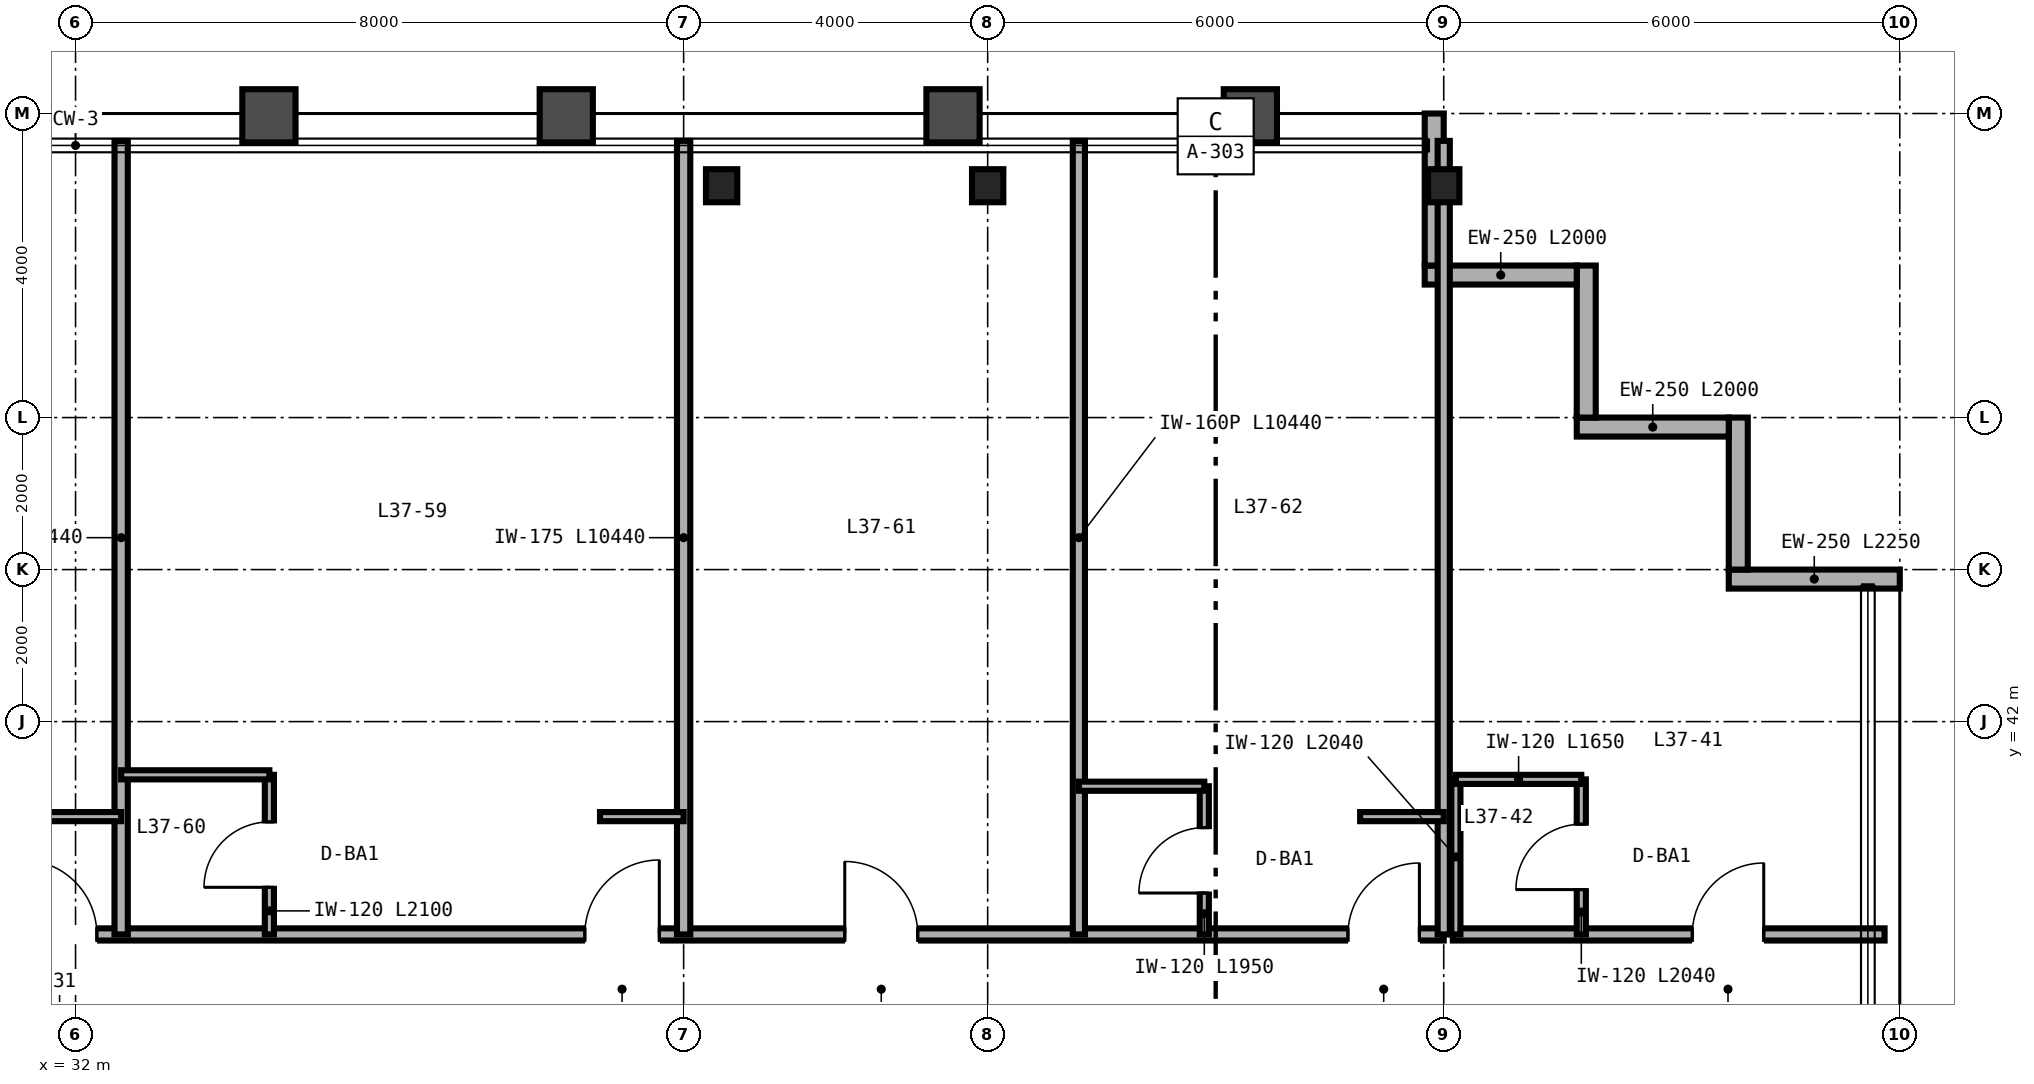
"""IFC4 building model, lengths in metres.
Left out: names, types, materials, properties, quantities, classifications, styles, units other than length and angle.
Written with IfcOpenShell. Run it as: python <this file> out.ifc"""

import sys

from ifc_helpers import new_model, si_unit, direction, frame, frame_2d, origin, origin_2d, place, context, subcontext, project, spatial, rectangle, i_section, extrude, source, transform, mapped, element, fill, save


model = new_model("IFC4")
c1 = context("Model", 3, precision=1e-05, world=origin(), true_north=direction((0.0, 1.0)))
c2 = subcontext(c1, "Body", "Model", "MODEL_VIEW")
j1 = project(units=[si_unit("LENGTHUNIT", "METRE"), si_unit("PLANEANGLEUNIT", "RADIAN")], contexts=[c1])
p1 = place(None, origin())
s1 = spatial("IfcSite", under=j1, at=p1, CompositionType="ELEMENT")
p2 = place(p1, origin())
s2 = spatial("IfcBuilding", under=s1, at=p2, CompositionType="ELEMENT")
p3 = place(p2, frame((0.0, 0.0, 147.6)))
s3 = spatial("IfcBuildingStorey", under=s2, at=p3, CompositionType="ELEMENT", Elevation=147.6)
m1 = source(origin(), c2, "Body", "SweptSolid", [
    extrude(i_section(OverallWidth=0.412, OverallDepth=0.435, WebThickness=0.036, FlangeThickness=0.057, FilletRadius=0.025, at=origin_2d()), origin(), (0.0, 0.0, 1.0), 3.28),
])
for number, where, z_axis, x_axis in (
    (1, (40.5, 49.05, 0.0), (0.0, 0.0, 1.0), (1.0, 0.0, 0.0)),
    (2, (44.0, 49.05, 0.0), (0.0, 0.0, 1.0), (1.0, 0.0, 0.0)),
    (3, (50.0, 49.05, 0.0), (0.0, 0.0, 1.0), (1.0, 0.0, 0.0)),
):
    element("IfcColumn", number, at=place(p3, frame(where, z_axis=z_axis, x_axis=x_axis)), inside=s3, PredefinedType="COLUMN", context=c2, shape_type="MappedRepresentation", body=[
        mapped(m1, transform((0.0, 0.0, 0.0), scale=1.0)),
    ])
p4 = place(p3, frame((56.0, 43.875, 0.0), z_axis=(0.0, 0.0, 1.0), x_axis=(-1.0, 0.0, 0.0)))
e4 = element("IfcWall", 4, at=p4, inside=s3, PredefinedType="SOLIDWALL", context=c2, shape_type="SweptSolid", body=[
    extrude(rectangle(XDim=2.25, YDim=0.25, at=frame_2d((1.125, 0.0))), origin(), (0.0, 0.0, 1.0), 3.28),
])
for number, where, z_axis, x_axis in (
    (5, (53.875, 44.0, 0.0), (0.0, 0.0, 1.0), (0.0, 1.0, 0.0)),
    (6, (53.75, 45.875, 0.0), (0.0, 0.0, 1.0), (-1.0, 0.0, 0.0)),
    (7, (51.875, 46.0, 0.0), (0.0, 0.0, 1.0), (0.0, 1.0, 0.0)),
    (8, (51.75, 47.875, 0.0), (0.0, 0.0, 1.0), (-1.0, 0.0, 0.0)),
):
    element("IfcWall", number, at=place(p3, frame(where, z_axis=z_axis, x_axis=x_axis)), inside=s3, PredefinedType="SOLIDWALL", context=c2, shape_type="SweptSolid", body=[
        extrude(rectangle(XDim=2.0, YDim=0.25, at=frame_2d((1.0, 0.0))), origin(), (0.0, 0.0, 1.0), 3.28),
    ])
p5 = place(p3, frame((49.875, 48.0, 0.0), z_axis=(0.0, 0.0, 1.0), x_axis=(0.0, 1.0, 0.0)))
e9 = element("IfcWall", 9, at=p5, inside=s3, PredefinedType="SOLIDWALL", context=c2, shape_type="SweptSolid", body=[
    extrude(rectangle(XDim=2.0, YDim=0.25, at=frame_2d((1.0, 0.0))), origin(), (0.0, 0.0, 1.0), 2.587),
])
p6 = place(p3, frame((50.12, 39.2, 0.0), z_axis=(0.0, 0.0, 1.0), x_axis=(1.0, 0.0, 0.0)))
e10 = element("IfcWall", 10, at=p6, inside=s3, PredefinedType="PARTITIONING", context=c2, shape_type="SweptSolid", body=[
    extrude(rectangle(XDim=5.68, YDim=0.16, at=frame_2d((2.84, 0.0))), origin(), (0.0, 0.0, 1.0), 3.28),
])
p7 = place(p6, frame((3.15, 0.0, 0.0)))
e11 = element("IfcOpeningElement", 11, at=p7, cuts=e10, PredefinedType="OPENING", context=c2, shape_type="SweptSolid", body=[
    extrude(rectangle(XDim=0.94, YDim=2.15, at=frame_2d((0.47, 1.075))), frame((0.0, 0.09, 0.0), z_axis=(0.0, -1.0, 0.0), x_axis=(1.0, 0.0, 0.0)), (0.0, 0.0, 1.0), 0.18),
])
p8 = place(p3, frame((51.81, 39.2, 0.0), z_axis=(0.0, 0.0, 1.0), x_axis=(0.0, 1.0, 0.0)))
e12 = element("IfcWall", 12, at=p8, inside=s3, PredefinedType="PARTITIONING", context=c2, shape_type="SweptSolid", body=[
    extrude(rectangle(XDim=2.04, YDim=0.12, at=frame_2d((1.02, 0.0))), origin(), (0.0, 0.0, 1.0), 3.28),
])
p9 = place(p8, frame((0.59, 0.0, 0.0)))
e13 = element("IfcOpeningElement", 13, at=p9, cuts=e12, PredefinedType="OPENING", context=c2, shape_type="SweptSolid", body=[
    extrude(rectangle(XDim=0.86, YDim=2.1, at=frame_2d((0.43, 1.05))), frame((0.0, 0.07, 0.0), z_axis=(0.0, -1.0, 0.0), x_axis=(1.0, 0.0, 0.0)), (0.0, 0.0, 1.0), 0.14),
])
p10 = place(p3, frame((50.16, 39.2, 0.0), z_axis=(0.0, 0.0, 1.0), x_axis=(0.0, 1.0, 0.0)))
e14 = element("IfcWall", 14, at=p10, inside=s3, PredefinedType="PARTITIONING", context=c2, shape_type="SweptSolid", body=[
    extrude(rectangle(XDim=2.04, YDim=0.12, at=frame_2d((1.02, 0.0))), origin(), (0.0, 0.0, 1.0), 3.28),
])
p11 = place(p3, frame((50.16, 41.24, 0.0), z_axis=(0.0, 0.0, 1.0), x_axis=(1.0, 0.0, 0.0)))
e15 = element("IfcWall", 15, at=p11, inside=s3, PredefinedType="PARTITIONING", context=c2, shape_type="SweptSolid", body=[
    extrude(rectangle(XDim=1.65, YDim=0.12, at=frame_2d((0.825, 0.0))), origin(), (0.0, 0.0, 1.0), 3.28),
])
p12 = place(p3, frame((14.0, 39.2, 0.0), z_axis=(0.0, 0.0, 1.0), x_axis=(1.0, 0.0, 0.0)))
e16 = element("IfcWall", 16, at=p12, inside=s3, PredefinedType="PARTITIONING", context=c2, shape_type="SweptSolid", body=[
    extrude(rectangle(XDim=36.0, YDim=0.16, at=frame_2d((18.0, 0.0))), origin(), (0.0, 0.0, 1.0), 2.501),
])
p13 = place(p12, frame((4.34, 0.0, 0.0)))
e17 = element("IfcOpeningElement", 17, at=p13, cuts=e16, PredefinedType="OPENING", context=c2, shape_type="SweptSolid", body=[
    extrude(rectangle(XDim=0.94, YDim=2.15, at=frame_2d((0.47, 1.075))), frame((0.0, 0.09, 0.0), z_axis=(0.0, -1.0, 0.0), x_axis=(1.0, 0.0, 0.0)), (0.0, 0.0, 1.0), 0.18),
])
p14 = place(p12, frame((9.94, 0.0, 0.0)))
e18 = element("IfcOpeningElement", 18, at=p14, cuts=e16, PredefinedType="OPENING", context=c2, shape_type="SweptSolid", body=[
    extrude(rectangle(XDim=0.94, YDim=2.15, at=frame_2d((0.47, 1.075))), frame((0.0, 0.09, 0.0), z_axis=(0.0, -1.0, 0.0), x_axis=(1.0, 0.0, 0.0)), (0.0, 0.0, 1.0), 0.18),
])
p15 = place(p12, frame((17.3, 0.0, 0.0)))
e19 = element("IfcOpeningElement", 19, at=p15, cuts=e16, PredefinedType="OPENING", context=c2, shape_type="SweptSolid", body=[
    extrude(rectangle(XDim=0.98, YDim=2.2, at=frame_2d((0.49, 1.1))), frame((0.0, 0.09, 0.0), z_axis=(0.0, -1.0, 0.0), x_axis=(1.0, 0.0, 0.0)), (0.0, 0.0, 1.0), 0.18),
])
p16 = place(p12, frame((24.7, 0.0, 0.0)))
e20 = element("IfcOpeningElement", 20, at=p16, cuts=e16, PredefinedType="OPENING", context=c2, shape_type="SweptSolid", body=[
    extrude(rectangle(XDim=0.98, YDim=2.2, at=frame_2d((0.49, 1.1))), frame((0.0, 0.09, 0.0), z_axis=(0.0, -1.0, 0.0), x_axis=(1.0, 0.0, 0.0)), (0.0, 0.0, 1.0), 0.18),
])
p17 = place(p12, frame((28.12, 0.0, 0.0)))
e21 = element("IfcOpeningElement", 21, at=p17, cuts=e16, PredefinedType="OPENING", context=c2, shape_type="SweptSolid", body=[
    extrude(rectangle(XDim=0.96, YDim=2.15, at=frame_2d((0.48, 1.075))), frame((0.0, 0.09, 0.0), z_axis=(0.0, -1.0, 0.0), x_axis=(1.0, 0.0, 0.0)), (0.0, 0.0, 1.0), 0.18),
])
p18 = place(p12, frame((34.74, 0.0, 0.0)))
e22 = element("IfcOpeningElement", 22, at=p18, cuts=e16, PredefinedType="OPENING", context=c2, shape_type="SweptSolid", body=[
    extrude(rectangle(XDim=0.94, YDim=2.15, at=frame_2d((0.47, 1.075))), frame((0.0, 0.09, 0.0), z_axis=(0.0, -1.0, 0.0), x_axis=(1.0, 0.0, 0.0)), (0.0, 0.0, 1.0), 0.18),
])
p19 = place(p3, frame((50.0, 39.2, 0.0), z_axis=(0.0, 0.0, 1.0), x_axis=(0.0, 1.0, 0.0)))
e23 = element("IfcWall", 23, at=p19, inside=s3, PredefinedType="PARTITIONING", context=c2, shape_type="SweptSolid", body=[
    extrude(rectangle(XDim=10.44, YDim=0.16, at=frame_2d((5.22, 0.0))), origin(), (0.0, 0.0, 1.0), 2.587),
])
p20 = place(p3, frame((32.6, 39.2, 0.0), z_axis=(0.0, 0.0, 1.0), x_axis=(0.0, 1.0, 0.0)))
e24 = element("IfcWall", 24, at=p20, inside=s3, PredefinedType="PARTITIONING", context=c2, shape_type="SweptSolid", body=[
    extrude(rectangle(XDim=10.44, YDim=0.175, at=frame_2d((5.22, 0.0))), origin(), (0.0, 0.0, 1.0), 2.36),
])
p21 = place(p3, frame((31.5, 40.75, 0.0), z_axis=(0.0, 0.0, 1.0), x_axis=(1.0, 0.0, 0.0)))
e25 = element("IfcWall", 25, at=p21, inside=s3, PredefinedType="PARTITIONING", context=c2, shape_type="SweptSolid", body=[
    extrude(rectangle(XDim=1.1, YDim=0.12, at=frame_2d((0.55, 0.0))), origin(), (0.0, 0.0, 1.0), 3.28),
])
p22 = place(p3, frame((40.0, 39.2, 0.0), z_axis=(0.0, 0.0, 1.0), x_axis=(0.0, 1.0, 0.0)))
e26 = element("IfcWall", 26, at=p22, inside=s3, PredefinedType="PARTITIONING", context=c2, shape_type="SweptSolid", body=[
    extrude(rectangle(XDim=10.44, YDim=0.175, at=frame_2d((5.22, 0.0))), origin(), (0.0, 0.0, 1.0), 2.36),
])
p23 = place(p3, frame((34.55, 39.2, 0.0), z_axis=(0.0, 0.0, 1.0), x_axis=(0.0, 1.0, 0.0)))
e27 = element("IfcWall", 27, at=p23, inside=s3, PredefinedType="PARTITIONING", context=c2, shape_type="SweptSolid", body=[
    extrude(rectangle(XDim=2.1, YDim=0.12, at=frame_2d((1.05, 0.0))), origin(), (0.0, 0.0, 1.0), 3.28),
])
p24 = place(p23, frame((0.62, 0.0, 0.0)))
e28 = element("IfcOpeningElement", 28, at=p24, cuts=e27, PredefinedType="OPENING", context=c2, shape_type="SweptSolid", body=[
    extrude(rectangle(XDim=0.86, YDim=2.1, at=frame_2d((0.43, 1.05))), frame((0.0, 0.07, 0.0), z_axis=(0.0, -1.0, 0.0), x_axis=(1.0, 0.0, 0.0)), (0.0, 0.0, 1.0), 0.14),
])
p25 = place(p3, frame((32.6, 41.3, 0.0), z_axis=(0.0, 0.0, 1.0), x_axis=(1.0, 0.0, 0.0)))
e29 = element("IfcWall", 29, at=p25, inside=s3, PredefinedType="PARTITIONING", context=c2, shape_type="SweptSolid", body=[
    extrude(rectangle(XDim=1.95, YDim=0.12, at=frame_2d((0.975, 0.0))), origin(), (0.0, 0.0, 1.0), 3.28),
])
p26 = place(p3, frame((38.9, 40.75, 0.0), z_axis=(0.0, 0.0, 1.0), x_axis=(1.0, 0.0, 0.0)))
e30 = element("IfcWall", 30, at=p26, inside=s3, PredefinedType="PARTITIONING", context=c2, shape_type="SweptSolid", body=[
    extrude(rectangle(XDim=1.1, YDim=0.12, at=frame_2d((0.55, 0.0))), origin(), (0.0, 0.0, 1.0), 3.28),
])
p27 = place(p3, frame((45.2, 39.2, 0.0), z_axis=(0.0, 0.0, 1.0), x_axis=(0.0, 1.0, 0.0)))
e31 = element("IfcWall", 31, at=p27, inside=s3, PredefinedType="PARTITIONING", context=c2, shape_type="SweptSolid", body=[
    extrude(rectangle(XDim=10.44, YDim=0.16, at=frame_2d((5.22, 0.0))), origin(), (0.0, 0.0, 1.0), 2.587),
])
p28 = place(p3, frame((46.85, 39.2, 0.0), z_axis=(0.0, 0.0, 1.0), x_axis=(0.0, 1.0, 0.0)))
e32 = element("IfcWall", 32, at=p28, inside=s3, PredefinedType="PARTITIONING", context=c2, shape_type="SweptSolid", body=[
    extrude(rectangle(XDim=1.95, YDim=0.12, at=frame_2d((0.975, 0.0))), origin(), (0.0, 0.0, 1.0), 3.28),
])
p29 = place(p28, frame((0.545, 0.0, 0.0)))
e33 = element("IfcOpeningElement", 33, at=p29, cuts=e32, PredefinedType="OPENING", context=c2, shape_type="SweptSolid", body=[
    extrude(rectangle(XDim=0.86, YDim=2.1, at=frame_2d((0.43, 1.05))), frame((0.0, 0.07, 0.0), z_axis=(0.0, -1.0, 0.0), x_axis=(1.0, 0.0, 0.0)), (0.0, 0.0, 1.0), 0.14),
])
p30 = place(p3, frame((45.2, 41.15, 0.0), z_axis=(0.0, 0.0, 1.0), x_axis=(1.0, 0.0, 0.0)))
e34 = element("IfcWall", 34, at=p30, inside=s3, PredefinedType="PARTITIONING", context=c2, shape_type="SweptSolid", body=[
    extrude(rectangle(XDim=1.65, YDim=0.12, at=frame_2d((0.825, 0.0))), origin(), (0.0, 0.0, 1.0), 3.28),
])
p31 = place(p3, frame((48.9, 40.75, 0.0), z_axis=(0.0, 0.0, 1.0), x_axis=(1.0, 0.0, 0.0)))
e35 = element("IfcWall", 35, at=p31, inside=s3, PredefinedType="PARTITIONING", context=c2, shape_type="SweptSolid", body=[
    extrude(rectangle(XDim=1.1, YDim=0.12, at=frame_2d((0.55, 0.0))), origin(), (0.0, 0.0, 1.0), 3.28),
])
m2 = source(origin(), c2, "Body", "SweptSolid", [
    extrude(rectangle(XDim=0.86, YDim=2.1, at=frame_2d((0.43, 1.05))), frame((0.0, 0.025, 0.0), z_axis=(0.0, -1.0, 0.0), x_axis=(1.0, 0.0, 0.0)), (0.0, 0.0, 1.0), 0.05),
])
p32 = place(p9, origin())
e36 = element("IfcDoor", 36, at=p32, inside=s3, OperationType="SINGLE_SWING_LEFT", PredefinedType="DOOR", context=c2, shape_type="MappedRepresentation", body=[
    mapped(m2, transform((0.0, 0.0, 0.0), scale=1.0)),
])
fill(e13, e36)
m3 = source(origin(), c2, "Body", "SweptSolid", [
    extrude(rectangle(XDim=0.94, YDim=2.15, at=frame_2d((0.47, 1.075))), frame((0.0, 0.025, 0.0), z_axis=(0.0, -1.0, 0.0), x_axis=(1.0, 0.0, 0.0)), (0.0, 0.0, 1.0), 0.05),
])
p33 = place(p7, origin())
e37 = element("IfcDoor", 37, at=p33, inside=s3, OperationType="SINGLE_SWING_RIGHT", PredefinedType="DOOR", context=c2, shape_type="MappedRepresentation", body=[
    mapped(m3, transform((0.0, 0.0, 0.0), scale=1.0)),
])
fill(e11, e37)
p34 = place(p24, origin())
e38 = element("IfcDoor", 38, at=p34, inside=s3, OperationType="SINGLE_SWING_LEFT", PredefinedType="DOOR", context=c2, shape_type="MappedRepresentation", body=[
    mapped(m2, transform((0.0, 0.0, 0.0), scale=1.0)),
])
fill(e28, e38)
p35 = place(p29, origin())
e39 = element("IfcDoor", 39, at=p35, inside=s3, OperationType="SINGLE_SWING_LEFT", PredefinedType="DOOR", context=c2, shape_type="MappedRepresentation", body=[
    mapped(m2, transform((0.0, 0.0, 0.0), scale=1.0)),
])
fill(e33, e39)
m4 = source(origin(), c2, "Body", "SweptSolid", [
    extrude(rectangle(XDim=0.98, YDim=2.2, at=frame_2d((0.49, 1.1))), frame((0.0, 0.025, 0.0), z_axis=(0.0, -1.0, 0.0), x_axis=(1.0, 0.0, 0.0)), (0.0, 0.0, 1.0), 0.05),
])
p36 = place(p15, origin())
e40 = element("IfcDoor", 40, at=p36, inside=s3, OperationType="SINGLE_SWING_LEFT", PredefinedType="DOOR", context=c2, shape_type="MappedRepresentation", body=[
    mapped(m4, transform((0.0, 0.0, 0.0), scale=1.0)),
])
fill(e19, e40)
p37 = place(p16, origin())
e41 = element("IfcDoor", 41, at=p37, inside=s3, OperationType="SINGLE_SWING_RIGHT", PredefinedType="DOOR", context=c2, shape_type="MappedRepresentation", body=[
    mapped(m4, transform((0.0, 0.0, 0.0), scale=1.0)),
])
fill(e20, e41)
m5 = source(origin(), c2, "Body", "SweptSolid", [
    extrude(rectangle(XDim=0.96, YDim=2.15, at=frame_2d((0.48, 1.075))), frame((0.0, 0.025, 0.0), z_axis=(0.0, -1.0, 0.0), x_axis=(1.0, 0.0, 0.0)), (0.0, 0.0, 1.0), 0.05),
])
p38 = place(p17, origin())
e42 = element("IfcDoor", 42, at=p38, inside=s3, OperationType="SINGLE_SWING_LEFT", PredefinedType="DOOR", context=c2, shape_type="MappedRepresentation", body=[
    mapped(m5, transform((0.0, 0.0, 0.0), scale=1.0)),
])
fill(e21, e42)
p39 = place(p18, origin())
e43 = element("IfcDoor", 43, at=p39, inside=s3, OperationType="SINGLE_SWING_RIGHT", PredefinedType="DOOR", context=c2, shape_type="MappedRepresentation", body=[
    mapped(m3, transform((0.0, 0.0, 0.0), scale=1.0)),
])
fill(e22, e43)
save(model, sys.argv[1])
